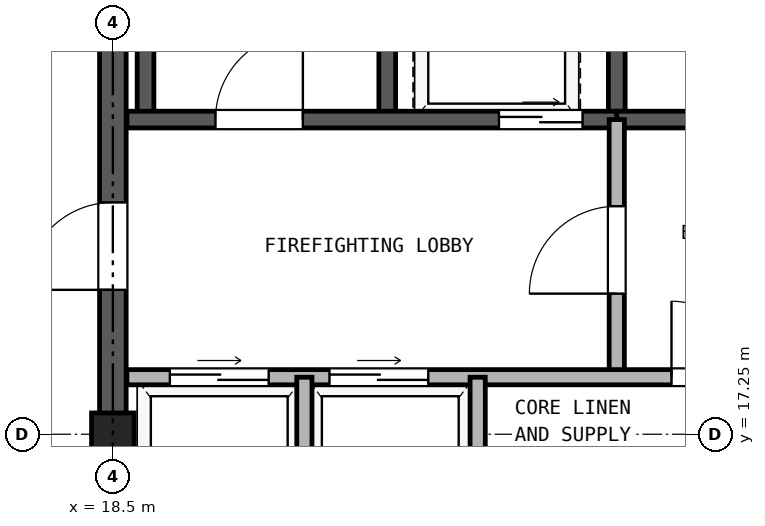
"""IFC4 building model, lengths in metres.
Left out: names, types, materials, properties, quantities, classifications, styles, units other than length and angle.
Written with IfcOpenShell. Run it as: python <this file> out.ifc"""

import sys

from ifc_helpers import new_model, si_unit, direction, frame, frame_2d, origin, origin_2d, place, context, subcontext, project, spatial, rectangle, hollow_rectangle, extrude, source, transform, mapped, element, fill, save


model = new_model("IFC4")
c1 = context("Model", 3, precision=1e-05, world=origin(), true_north=direction((0.0, 1.0)))
c2 = subcontext(c1, "Body", "Model", "MODEL_VIEW")
j1 = project(units=[si_unit("LENGTHUNIT", "METRE"), si_unit("PLANEANGLEUNIT", "RADIAN")], contexts=[c1])
p1 = place(None, origin())
s1 = spatial("IfcSite", under=j1, at=p1, CompositionType="ELEMENT")
p2 = place(p1, origin())
s2 = spatial("IfcBuilding", under=s1, at=p2, CompositionType="ELEMENT")
p3 = place(p2, frame((0.0, 0.0, 268.1)))
s3 = spatial("IfcBuildingStorey", under=s2, at=p3, CompositionType="ELEMENT", Elevation=268.1)
m1 = source(origin(), c2, "Body", "SweptSolid", [
    extrude(hollow_rectangle(XDim=0.56, YDim=0.56, WallThickness=0.03, at=origin_2d()), origin(), (0.0, 0.0, 1.0), 2.98),
])
p4 = place(p3, frame((18.5, 17.25, 0.0), z_axis=(0.0, 0.0, 1.0), x_axis=(1.0, 0.0, 0.0)))
e1 = element("IfcColumn", 1, at=p4, inside=s3, PredefinedType="COLUMN", context=c2, shape_type="MappedRepresentation", body=[
    mapped(m1, transform((0.0, 0.0, 0.0), x_axis=(1.0, 0.0, 0.0), y_axis=(0.0, 1.0, 0.0), z_axis=(0.0, 0.0, 1.0), scale=1.0)),
])
p5 = place(p3, frame((18.5, 11.675, 0.0), z_axis=(0.0, 0.0, 1.0), x_axis=(0.0, 1.0, 0.0)))
e2 = element("IfcWall", 2, at=p5, inside=s3, PredefinedType="SHEAR", context=c2, shape_type="SweptSolid", body=[
    extrude(rectangle(XDim=16.9, YDim=0.35, at=frame_2d((8.45, 0.0))), origin(), (0.0, 0.0, 1.0), 2.98),
])
p6 = place(p5, frame((7.475, 0.0, 0.0)))
e3 = element("IfcOpeningElement", 3, at=p6, cuts=e2, PredefinedType="OPENING", context=c2, shape_type="SweptSolid", body=[
    extrude(rectangle(XDim=1.15, YDim=2.2, at=frame_2d((0.575, 1.1))), frame((0.0, 0.185, 0.0), z_axis=(0.0, -1.0, 0.0), x_axis=(1.0, 0.0, 0.0)), (0.0, 0.0, 1.0), 0.37),
])
for number, where, z_axis, x_axis in (
    (4, (18.93, 21.39, 0.0), (0.0, 0.0, 1.0), (0.0, 1.0, 0.0)),
    (5, (22.11, 21.39, 0.0), (0.0, 0.0, 1.0), (0.0, 1.0, 0.0)),
    (6, (25.13, 21.39, 0.0), (0.0, 0.0, 1.0), (0.0, 1.0, 0.0)),
):
    element("IfcWall", number, at=place(p3, frame(where, z_axis=z_axis, x_axis=x_axis)), inside=s3, PredefinedType="SOLIDWALL", context=c2, shape_type="SweptSolid", body=[
        extrude(rectangle(XDim=7.11, YDim=0.22, at=frame_2d((3.555, 0.0))), origin(), (0.0, 0.0, 1.0), 2.98),
    ])
p7 = place(p3, frame((18.685, 21.39, 0.0), z_axis=(0.0, 0.0, 1.0), x_axis=(1.0, 0.0, 0.0)))
e7 = element("IfcWall", 7, at=p7, inside=s3, PredefinedType="SOLIDWALL", context=c2, shape_type="SweptSolid", body=[
    extrude(rectangle(XDim=6.445, YDim=0.22, at=frame_2d((3.222, 0.0))), origin(), (0.0, 0.0, 1.0), 2.98),
])
p8 = place(p7, frame((1.165, 0.0, 0.0)))
e8 = element("IfcOpeningElement", 8, at=p8, cuts=e7, PredefinedType="OPENING", context=c2, shape_type="SweptSolid", body=[
    extrude(rectangle(XDim=1.15, YDim=2.2, at=frame_2d((0.575, 1.1))), frame((0.0, 0.12, 0.0), z_axis=(0.0, -1.0, 0.0), x_axis=(1.0, 0.0, 0.0)), (0.0, 0.0, 1.0), 0.24),
])
p9 = place(p7, frame((4.895, 0.0, 0.0)))
e9 = element("IfcOpeningElement", 9, at=p9, cuts=e7, PredefinedType="OPENING", context=c2, shape_type="SweptSolid", body=[
    extrude(rectangle(XDim=1.1, YDim=2.25, at=frame_2d((0.55, 1.125))), frame((0.0, 0.12, 0.0), z_axis=(0.0, -1.0, 0.0), x_axis=(1.0, 0.0, 0.0)), (0.0, 0.0, 1.0), 0.24),
])
p10 = place(p3, frame((25.13, 21.39, 0.0), z_axis=(0.0, 0.0, 1.0), x_axis=(1.0, 0.0, 0.0)))
e10 = element("IfcWall", 10, at=p10, inside=s3, PredefinedType="SOLIDWALL", context=c2, shape_type="SweptSolid", body=[
    extrude(rectangle(XDim=3.185, YDim=0.22, at=frame_2d((1.593, 0.0))), origin(), (0.0, 0.0, 1.0), 2.98),
])
p11 = place(p10, frame((0.92, 0.0, 0.0)))
e11 = element("IfcOpeningElement", 11, at=p11, cuts=e10, PredefinedType="OPENING", context=c2, shape_type="SweptSolid", body=[
    extrude(rectangle(XDim=1.15, YDim=2.2, at=frame_2d((0.575, 1.1))), frame((0.0, 0.12, 0.0), z_axis=(0.0, -1.0, 0.0), x_axis=(1.0, 0.0, 0.0)), (0.0, 0.0, 1.0), 0.24),
])
p12 = place(p3, frame((25.13, 18.0, 0.0), z_axis=(0.0, 0.0, 1.0), x_axis=(0.0, 1.0, 0.0)))
e12 = element("IfcWall", 12, at=p12, inside=s3, PredefinedType="PARTITIONING", context=c2, shape_type="SweptSolid", body=[
    extrude(rectangle(XDim=3.39, YDim=0.2, at=frame_2d((1.695, 0.0))), origin(), (0.0, 0.0, 1.0), 2.98),
])
p13 = place(p12, frame((1.1, 0.0, 0.0)))
e13 = element("IfcOpeningElement", 13, at=p13, cuts=e12, PredefinedType="OPENING", context=c2, shape_type="SweptSolid", body=[
    extrude(rectangle(XDim=1.15, YDim=2.2, at=frame_2d((0.575, 1.1))), frame((0.0, 0.11, 0.0), z_axis=(0.0, -1.0, 0.0), x_axis=(1.0, 0.0, 0.0)), (0.0, 0.0, 1.0), 0.22),
])
p14 = place(p3, frame((18.685, 18.0, 0.0), z_axis=(0.0, 0.0, 1.0), x_axis=(1.0, 0.0, 0.0)))
e14 = element("IfcWall", 14, at=p14, inside=s3, PredefinedType="PARTITIONING", context=c2, shape_type="SweptSolid", body=[
    extrude(rectangle(XDim=9.63, YDim=0.2, at=frame_2d((4.815, 0.0))), origin(), (0.0, 0.0, 1.0), 2.98),
])
p15 = place(p14, frame((0.565, 0.0, 0.0)))
e15 = element("IfcOpeningElement", 15, at=p15, cuts=e14, PredefinedType="OPENING", context=c2, shape_type="SweptSolid", body=[
    extrude(rectangle(XDim=1.3, YDim=2.3, at=frame_2d((0.65, 1.15))), frame((0.0, 0.11, 0.0), z_axis=(0.0, -1.0, 0.0), x_axis=(1.0, 0.0, 0.0)), (0.0, 0.0, 1.0), 0.22),
])
p16 = place(p14, frame((2.665, 0.0, 0.0)))
e16 = element("IfcOpeningElement", 16, at=p16, cuts=e14, PredefinedType="OPENING", context=c2, shape_type="SweptSolid", body=[
    extrude(rectangle(XDim=1.3, YDim=2.3, at=frame_2d((0.65, 1.15))), frame((0.0, 0.11, 0.0), z_axis=(0.0, -1.0, 0.0), x_axis=(1.0, 0.0, 0.0)), (0.0, 0.0, 1.0), 0.22),
])
p17 = place(p14, frame((7.165, 0.0, 0.0)))
e17 = element("IfcOpeningElement", 17, at=p17, cuts=e14, PredefinedType="OPENING", context=c2, shape_type="SweptSolid", body=[
    extrude(rectangle(XDim=1.0, YDim=2.15, at=frame_2d((0.5, 1.075))), frame((0.0, 0.11, 0.0), z_axis=(0.0, -1.0, 0.0), x_axis=(1.0, 0.0, 0.0)), (0.0, 0.0, 1.0), 0.22),
])
for number, where, z_axis, x_axis in (
    (18, (21.02, 15.0, 0.0), (0.0, 0.0, 1.0), (0.0, 1.0, 0.0)),
    (19, (23.3, 15.0, 0.0), (0.0, 0.0, 1.0), (0.0, 1.0, 0.0)),
):
    element("IfcWall", number, at=place(p3, frame(where, z_axis=z_axis, x_axis=x_axis)), inside=s3, PredefinedType="PARTITIONING", context=c2, shape_type="SweptSolid", body=[
        extrude(rectangle(XDim=3.0, YDim=0.2, at=frame_2d((1.5, 0.0))), origin(), (0.0, 0.0, 1.0), 2.98),
    ])
p18 = place(p8, frame((1.15, 0.0, 0.0), z_axis=(0.0, 0.0, 1.0), x_axis=(-1.0, 0.0, 0.0)))
e20 = element("IfcDoor", 20, at=p18, inside=s3, OperationType="SINGLE_SWING_RIGHT", PredefinedType="DOOR", context=c2, shape_type="SweptSolid", body=[
    extrude(rectangle(XDim=1.15, YDim=2.2, at=frame_2d((0.575, 1.1))), frame((0.0, 0.025, 0.0), z_axis=(0.0, -1.0, 0.0), x_axis=(1.0, 0.0, 0.0)), (0.0, 0.0, 1.0), 0.05),
])
fill(e8, e20)
p19 = place(p9, frame((1.1, 0.0, 0.0), z_axis=(0.0, 0.0, 1.0), x_axis=(-1.0, 0.0, 0.0)))
e21 = element("IfcDoor", 21, at=p19, inside=s3, OperationType="DOUBLE_DOOR_SLIDING", PredefinedType="DOOR", context=c2, shape_type="SweptSolid", body=[
    extrude(rectangle(XDim=1.1, YDim=2.25, at=frame_2d((0.55, 1.125))), frame((0.0, 0.025, 0.0), z_axis=(0.0, -1.0, 0.0), x_axis=(1.0, 0.0, 0.0)), (0.0, 0.0, 1.0), 0.05),
])
fill(e9, e21)
p20 = place(p13, origin())
e22 = element("IfcDoor", 22, at=p20, inside=s3, OperationType="SINGLE_SWING_LEFT", PredefinedType="DOOR", context=c2, shape_type="SweptSolid", body=[
    extrude(rectangle(XDim=1.15, YDim=2.2, at=frame_2d((0.575, 1.1))), frame((0.0, 0.025, 0.0), z_axis=(0.0, -1.0, 0.0), x_axis=(1.0, 0.0, 0.0)), (0.0, 0.0, 1.0), 0.05),
])
fill(e13, e22)
p21 = place(p15, origin())
e23 = element("IfcDoor", 23, at=p21, inside=s3, OperationType="DOUBLE_DOOR_SLIDING", PredefinedType="DOOR", context=c2, shape_type="SweptSolid", body=[
    extrude(rectangle(XDim=1.3, YDim=2.3, at=frame_2d((0.65, 1.15))), frame((0.0, 0.025, 0.0), z_axis=(0.0, -1.0, 0.0), x_axis=(1.0, 0.0, 0.0)), (0.0, 0.0, 1.0), 0.05),
])
fill(e15, e23)
p22 = place(p16, origin())
e24 = element("IfcDoor", 24, at=p22, inside=s3, OperationType="DOUBLE_DOOR_SLIDING", PredefinedType="DOOR", context=c2, shape_type="SweptSolid", body=[
    extrude(rectangle(XDim=1.3, YDim=2.3, at=frame_2d((0.65, 1.15))), frame((0.0, 0.025, 0.0), z_axis=(0.0, -1.0, 0.0), x_axis=(1.0, 0.0, 0.0)), (0.0, 0.0, 1.0), 0.05),
])
fill(e16, e24)
p23 = place(p17, frame((1.0, 0.0, 0.0), z_axis=(0.0, 0.0, 1.0), x_axis=(-1.0, 0.0, 0.0)))
e25 = element("IfcDoor", 25, at=p23, inside=s3, OperationType="SINGLE_SWING_LEFT", PredefinedType="DOOR", context=c2, shape_type="SweptSolid", body=[
    extrude(rectangle(XDim=1.0, YDim=2.15, at=frame_2d((0.5, 1.075))), frame((0.0, 0.025, 0.0), z_axis=(0.0, -1.0, 0.0), x_axis=(1.0, 0.0, 0.0)), (0.0, 0.0, 1.0), 0.05),
])
fill(e17, e25)
p24 = place(p6, frame((1.15, 0.0, 0.0), z_axis=(0.0, 0.0, 1.0), x_axis=(-1.0, 0.0, 0.0)))
e26 = element("IfcDoor", 26, at=p24, inside=s3, OperationType="SINGLE_SWING_LEFT", PredefinedType="DOOR", context=c2, shape_type="SweptSolid", body=[
    extrude(rectangle(XDim=1.15, YDim=2.2, at=frame_2d((0.575, 1.1))), frame((0.0, 0.025, 0.0), z_axis=(0.0, -1.0, 0.0), x_axis=(1.0, 0.0, 0.0)), (0.0, 0.0, 1.0), 0.05),
])
fill(e3, e26)
save(model, sys.argv[1])
